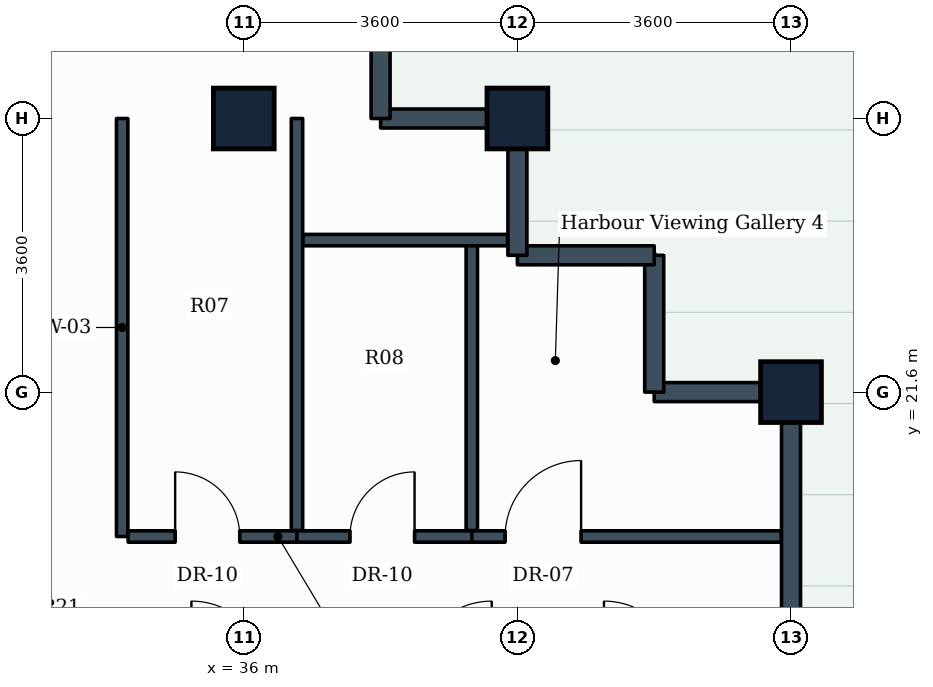
"""IFC4 building model, lengths in metres.
Left out: names, types, materials, properties, quantities, classifications, styles, units other than length and angle.
Written with IfcOpenShell. Run it as: python <this file> out.ifc"""

import sys

from ifc_helpers import new_model, si_unit, direction, frame, frame_2d, origin, origin_2d, place, context, subcontext, project, spatial, rectangle, extrude, element, fill, save


model = new_model("IFC4")
c1 = context("Model", 3, precision=1e-05, world=origin(), true_north=direction((0.0, 1.0)))
c2 = subcontext(c1, "Body", "Model", "MODEL_VIEW")
j1 = project(units=[si_unit("LENGTHUNIT", "METRE"), si_unit("PLANEANGLEUNIT", "RADIAN")], contexts=[c1])
p1 = place(None, origin())
s1 = spatial("IfcSite", under=j1, at=p1, CompositionType="ELEMENT")
p2 = place(p1, origin())
s2 = spatial("IfcBuilding", under=s1, at=p2, CompositionType="ELEMENT")
p3 = place(p2, frame((0.0, 0.0, 221.0)))
s3 = spatial("IfcBuildingStorey", under=s2, at=p3, CompositionType="ELEMENT", Elevation=221.0)
for number, where, z_axis, x_axis in (
    (1, (36.0, 25.2, 0.0), (0.0, 0.0, 1.0), (1.0, 0.0, 0.0)),
    (2, (39.6, 25.2, 0.0), (0.0, 0.0, 1.0), (1.0, 0.0, 0.0)),
    (3, (43.2, 21.6, 0.0), (0.0, 0.0, 1.0), (0.0, 1.0, 0.0)),
):
    element("IfcColumn", number, at=place(p3, frame(where, z_axis=z_axis, x_axis=x_axis)), inside=s3, PredefinedType="COLUMN", context=c2, shape_type="SweptSolid", body=[
        extrude(rectangle(XDim=0.8, YDim=0.8, at=origin_2d()), origin(), (0.0, 0.0, 1.0), 3.6),
    ])
p4 = place(p3, frame((43.2, 21.6, 0.0), z_axis=(0.0, 0.0, 1.0), x_axis=(0.0, -1.0, 0.0)))
e4 = element("IfcWall", 4, at=p4, inside=s3, PredefinedType="STANDARD", context=c2, shape_type="SweptSolid", body=[
    extrude(rectangle(XDim=3.6, YDim=0.25, at=frame_2d((1.8, 0.0))), origin(), (0.0, 0.0, 1.0), 2.83),
])
p5 = place(p3, frame((41.4, 21.6, 0.0), z_axis=(0.0, 0.0, 1.0), x_axis=(1.0, 0.0, 0.0)))
e5 = element("IfcWall", 5, at=p5, inside=s3, PredefinedType="STANDARD", context=c2, shape_type="SweptSolid", body=[
    extrude(rectangle(XDim=1.8, YDim=0.25, at=frame_2d((0.9, 0.0))), origin(), (0.0, 0.0, 1.0), 2.83),
])
for number, where, z_axis, x_axis in (
    (6, (41.4, 23.4, 0.0), (0.0, 0.0, 1.0), (0.0, -1.0, 0.0)),
    (7, (39.6, 23.4, 0.0), (0.0, 0.0, 1.0), (1.0, 0.0, 0.0)),
):
    element("IfcWall", number, at=place(p3, frame(where, z_axis=z_axis, x_axis=x_axis)), inside=s3, PredefinedType="STANDARD", context=c2, shape_type="SweptSolid", body=[
        extrude(rectangle(XDim=1.8, YDim=0.25, at=frame_2d((0.9, 0.0))), origin(), (0.0, 0.0, 1.0), 3.335),
    ])
for number, where, z_axis, x_axis in (
    (8, (39.6, 25.2, 0.0), (0.0, 0.0, 1.0), (0.0, -1.0, 0.0)),
    (9, (37.8, 25.2, 0.0), (0.0, 0.0, 1.0), (1.0, 0.0, 0.0)),
):
    element("IfcWall", number, at=place(p3, frame(where, z_axis=z_axis, x_axis=x_axis)), inside=s3, PredefinedType="STANDARD", context=c2, shape_type="SweptSolid", body=[
        extrude(rectangle(XDim=1.8, YDim=0.25, at=frame_2d((0.9, 0.0))), origin(), (0.0, 0.0, 1.0), 2.83),
    ])
p6 = place(p3, frame((37.8, 27.3, 0.0), z_axis=(0.0, 0.0, 1.0), x_axis=(0.0, -1.0, 0.0)))
e10 = element("IfcWall", 10, at=p6, inside=s3, PredefinedType="STANDARD", context=c2, shape_type="SweptSolid", body=[
    extrude(rectangle(XDim=2.1, YDim=0.25, at=frame_2d((1.05, 0.0))), origin(), (0.0, 0.0, 1.0), 2.83),
])
p7 = place(p3, frame((34.4, 19.7, 0.0), z_axis=(0.0, 0.0, 1.0), x_axis=(0.0, 1.0, 0.0)))
e11 = element("IfcWall", 11, at=p7, inside=s3, PredefinedType="PARTITIONING", context=c2, shape_type="SweptSolid", body=[
    extrude(rectangle(XDim=5.5, YDim=0.15, at=frame_2d((2.75, 0.0))), origin(), (0.0, 0.0, 1.0), 2.83),
])
p8 = place(p3, frame((34.479, 19.7, 0.0), z_axis=(0.0, 0.0, 1.0), x_axis=(1.0, 0.0, 0.0)))
e12 = element("IfcWall", 12, at=p8, inside=s3, PredefinedType="PARTITIONING", context=c2, shape_type="SweptSolid", body=[
    extrude(rectangle(XDim=2.221, YDim=0.15, at=frame_2d((1.11, 0.0))), origin(), (0.0, 0.0, 1.0), 3.02),
])
p9 = place(p8, frame((0.618, 0.0, 0.0)))
e13 = element("IfcOpeningElement", 13, at=p9, cuts=e12, PredefinedType="OPENING", context=c2, shape_type="SweptSolid", body=[
    extrude(rectangle(XDim=0.85, YDim=2.1, at=frame_2d((0.425, 1.05))), frame((0.0, 0.085, 0.0), z_axis=(0.0, -1.0, 0.0), x_axis=(1.0, 0.0, 0.0)), (0.0, 0.0, 1.0), 0.17),
])
p10 = place(p3, frame((36.7, 19.779, 0.0), z_axis=(0.0, 0.0, 1.0), x_axis=(0.0, 1.0, 0.0)))
e14 = element("IfcWall", 14, at=p10, inside=s3, PredefinedType="PARTITIONING", context=c2, shape_type="SweptSolid", body=[
    extrude(rectangle(XDim=5.421, YDim=0.15, at=frame_2d((2.71, 0.0))), origin(), (0.0, 0.0, 1.0), 2.83),
])
p11 = place(p3, frame((36.7, 19.7, 0.0), z_axis=(0.0, 0.0, 1.0), x_axis=(1.0, 0.0, 0.0)))
e15 = element("IfcWall", 15, at=p11, inside=s3, PredefinedType="PARTITIONING", context=c2, shape_type="SweptSolid", body=[
    extrude(rectangle(XDim=2.3, YDim=0.15, at=frame_2d((1.15, 0.0))), origin(), (0.0, 0.0, 1.0), 3.335),
])
p12 = place(p11, frame((0.697, 0.0, 0.0)))
e16 = element("IfcOpeningElement", 16, at=p12, cuts=e15, PredefinedType="OPENING", context=c2, shape_type="SweptSolid", body=[
    extrude(rectangle(XDim=0.85, YDim=2.1, at=frame_2d((0.425, 1.05))), frame((0.0, 0.085, 0.0), z_axis=(0.0, -1.0, 0.0), x_axis=(1.0, 0.0, 0.0)), (0.0, 0.0, 1.0), 0.17),
])
p13 = place(p3, frame((39.0, 19.779, 0.0), z_axis=(0.0, 0.0, 1.0), x_axis=(0.0, 1.0, 0.0)))
e17 = element("IfcWall", 17, at=p13, inside=s3, PredefinedType="PARTITIONING", context=c2, shape_type="SweptSolid", body=[
    extrude(rectangle(XDim=3.821, YDim=0.15, at=frame_2d((1.911, 0.0))), origin(), (0.0, 0.0, 1.0), 3.335),
])
p14 = place(p3, frame((36.779, 23.6, 0.0), z_axis=(0.0, 0.0, 1.0), x_axis=(1.0, 0.0, 0.0)))
e18 = element("IfcWall", 18, at=p14, inside=s3, PredefinedType="PARTITIONING", context=c2, shape_type="SweptSolid", body=[
    extrude(rectangle(XDim=2.692, YDim=0.15, at=frame_2d((1.346, 0.0))), origin(), (0.0, 0.0, 1.0), 3.335),
])
p15 = place(p3, frame((39.0, 19.7, 0.0), z_axis=(0.0, 0.0, 1.0), x_axis=(1.0, 0.0, 0.0)))
e19 = element("IfcWall", 19, at=p15, inside=s3, PredefinedType="PARTITIONING", context=c2, shape_type="SweptSolid", body=[
    extrude(rectangle(XDim=4.071, YDim=0.15, at=frame_2d((2.036, 0.0))), origin(), (0.0, 0.0, 1.0), 2.83),
])
p16 = place(p15, frame((0.438, 0.0, 0.0)))
e20 = element("IfcOpeningElement", 20, at=p16, cuts=e19, PredefinedType="OPENING", context=c2, shape_type="SweptSolid", body=[
    extrude(rectangle(XDim=1.0, YDim=2.1, at=frame_2d((0.5, 1.05))), frame((0.0, 0.085, 0.0), z_axis=(0.0, -1.0, 0.0), x_axis=(1.0, 0.0, 0.0)), (0.0, 0.0, 1.0), 0.17),
])
p17 = place(p9, origin())
e21 = element("IfcDoor", 21, at=p17, inside=s3, OperationType="SINGLE_SWING_LEFT", PredefinedType="DOOR", context=c2, shape_type="SweptSolid", body=[
    extrude(rectangle(XDim=0.85, YDim=2.1, at=frame_2d((0.425, 1.05))), frame((0.0, 0.025, 0.0), z_axis=(0.0, -1.0, 0.0), x_axis=(1.0, 0.0, 0.0)), (0.0, 0.0, 1.0), 0.05),
])
fill(e13, e21)
p18 = place(p12, origin())
e22 = element("IfcDoor", 22, at=p18, inside=s3, OperationType="SINGLE_SWING_RIGHT", PredefinedType="DOOR", context=c2, shape_type="SweptSolid", body=[
    extrude(rectangle(XDim=0.85, YDim=2.1, at=frame_2d((0.425, 1.05))), frame((0.0, 0.025, 0.0), z_axis=(0.0, -1.0, 0.0), x_axis=(1.0, 0.0, 0.0)), (0.0, 0.0, 1.0), 0.05),
])
fill(e16, e22)
p19 = place(p16, origin())
e23 = element("IfcDoor", 23, at=p19, inside=s3, OperationType="SINGLE_SWING_RIGHT", PredefinedType="DOOR", context=c2, shape_type="SweptSolid", body=[
    extrude(rectangle(XDim=1.0, YDim=2.1, at=frame_2d((0.5, 1.05))), frame((0.0, 0.025, 0.0), z_axis=(0.0, -1.0, 0.0), x_axis=(1.0, 0.0, 0.0)), (0.0, 0.0, 1.0), 0.05),
])
fill(e20, e23)
save(model, sys.argv[1])
